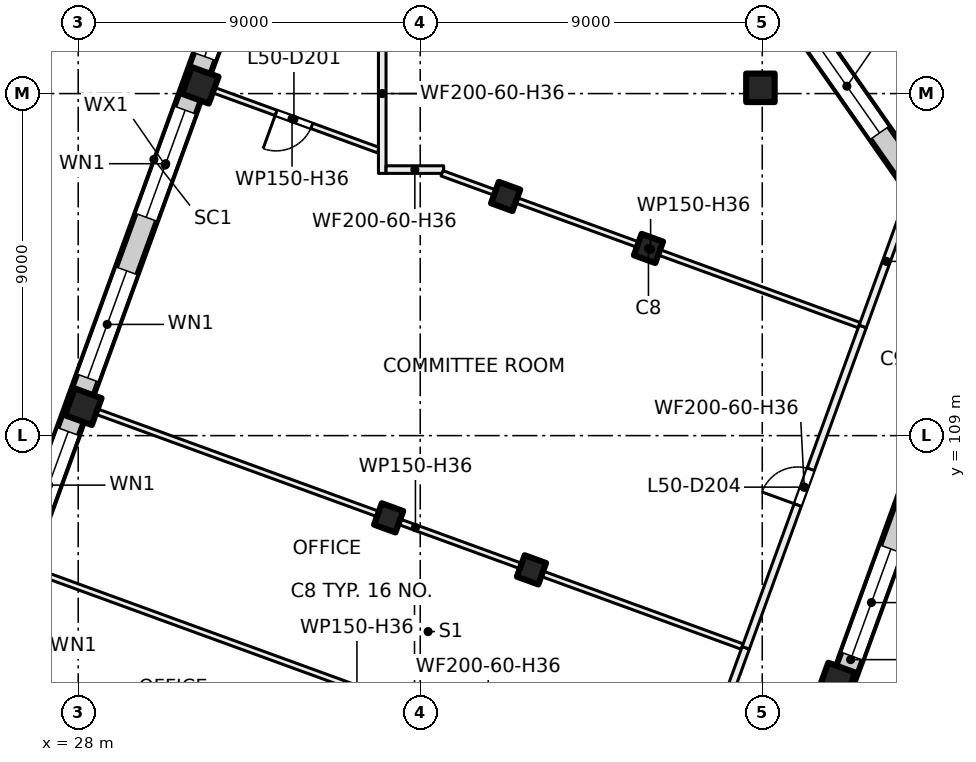
"""IFC4 building model, lengths in metres.
Left out: names, types, materials, properties, quantities, classifications, styles, units other than length and angle.
Written with IfcOpenShell. Run it as: python <this file> out.ifc"""

import sys

from ifc_helpers import new_model, si_unit, direction, frame, frame_2d, origin, origin_2d, place, context, subcontext, project, spatial, rectangle, extrude, element, fill, save


model = new_model("IFC4")
c1 = context("Model", 3, precision=1e-05, world=origin(), true_north=direction((0.0, 1.0)))
c2 = subcontext(c1, "Body", "Model", "MODEL_VIEW")
j1 = project(units=[si_unit("LENGTHUNIT", "METRE"), si_unit("PLANEANGLEUNIT", "RADIAN")], contexts=[c1])
p1 = place(None, origin())
s1 = spatial("IfcSite", under=j1, at=p1, CompositionType="ELEMENT")
p2 = place(p1, origin())
s2 = spatial("IfcBuilding", under=s1, at=p2, CompositionType="ELEMENT")
p3 = place(p2, frame((0.0, 0.0, 212.0)))
s3 = spatial("IfcBuildingStorey", under=s2, at=p3, CompositionType="ELEMENT", Elevation=212.0)
p4 = place(p3, frame((45.952, 118.152, 0.0), z_axis=(0.0, 0.0, 1.0), x_axis=(1.0, 0.0, 0.0)))
e1 = element("IfcColumn", 1, at=p4, inside=s3, PredefinedType="COLUMN", context=c2, shape_type="SweptSolid", body=[
    extrude(rectangle(XDim=0.75, YDim=0.75, at=origin_2d()), origin(), (0.0, 0.0, 1.0), 4.0),
])
for number, where, z_axis, x_axis in (
    (2, (43.006, 113.925, 0.0), (0.0, 0.0, 1.0), (-0.342, -0.94, 0.0)),
    (3, (39.927, 105.468, 0.0), (0.0, 0.0, 1.0), (-0.342, -0.94, 0.0)),
    (4, (39.247, 115.293, 0.0), (0.0, 0.0, 1.0), (-0.342, -0.94, 0.0)),
    (5, (36.169, 106.836, 0.0), (0.0, 0.0, 1.0), (-0.342, -0.94, 0.0)),
):
    element("IfcColumn", number, at=place(p3, frame(where, z_axis=z_axis, x_axis=x_axis)), inside=s3, PredefinedType="COLUMN", context=c2, shape_type="SweptSolid", body=[
        extrude(rectangle(XDim=0.6, YDim=0.6, at=origin_2d()), origin(), (0.0, 0.0, 1.0), 4.0),
    ])
for number, where, z_axis, x_axis in (
    (6, (47.962, 102.544, 0.0), (0.0, 0.0, 1.0), (-0.342, -0.94, 0.0)),
    (7, (31.212, 118.218, 0.0), (0.0, 0.0, 1.0), (-0.342, -0.94, 0.0)),
    (8, (28.134, 109.76, 0.0), (0.0, 0.0, 1.0), (-0.342, -0.94, 0.0)),
):
    element("IfcColumn", number, at=place(p3, frame(where, z_axis=z_axis, x_axis=x_axis)), inside=s3, PredefinedType="COLUMN", context=c2, shape_type="SweptSolid", body=[
        extrude(rectangle(XDim=0.75, YDim=0.75, at=origin_2d()), origin(), (0.0, 0.0, 1.0), 4.0),
    ])
p5 = place(p3, frame((58.083, 117.369, 0.0), z_axis=(0.0, 0.0, 1.0), x_axis=(-0.573573095716, 0.819154383416, 0.0)))
e9 = element("IfcWall", 9, at=p5, inside=s3, PredefinedType="SOLIDWALL", context=c2, shape_type="SweptSolid", body=[
    extrude(rectangle(XDim=26.037, YDim=0.6, at=frame_2d((13.019, 0.0))), origin(), (0.0, 0.0, 1.0), 3.625),
])
p6 = place(p5, frame((1.05, 0.0, 0.0)))
e10 = element("IfcOpeningElement", 10, at=p6, cuts=e9, PredefinedType="OPENING", context=c2, shape_type="SweptSolid", body=[
    extrude(rectangle(XDim=1.8, YDim=2.4, at=frame_2d((0.9, 1.2))), frame((0.0, 0.31, 0.0), z_axis=(0.0, -1.0, 0.0), x_axis=(1.0, 0.0, 0.0)), (0.0, 0.0, 1.0), 0.62),
])
p7 = place(p5, frame((4.829, 0.0, 0.9)))
e11 = element("IfcOpeningElement", 11, at=p7, cuts=e9, PredefinedType="OPENING", context=c2, shape_type="SweptSolid", body=[
    extrude(rectangle(XDim=3.0, YDim=2.4, at=frame_2d((1.5, 1.2))), frame((0.0, 0.31, 0.0), z_axis=(0.0, -1.0, 0.0), x_axis=(1.0, 0.0, 0.0)), (0.0, 0.0, 1.0), 0.62),
])
p8 = place(p5, frame((9.209, 0.0, 0.9)))
e12 = element("IfcOpeningElement", 12, at=p8, cuts=e9, PredefinedType="OPENING", context=c2, shape_type="SweptSolid", body=[
    extrude(rectangle(XDim=3.0, YDim=2.4, at=frame_2d((1.5, 1.2))), frame((0.0, 0.31, 0.0), z_axis=(0.0, -1.0, 0.0), x_axis=(1.0, 0.0, 0.0)), (0.0, 0.0, 1.0), 0.62),
])
p9 = place(p5, frame((13.588, 0.0, 0.9)))
e13 = element("IfcOpeningElement", 13, at=p9, cuts=e9, PredefinedType="OPENING", context=c2, shape_type="SweptSolid", body=[
    extrude(rectangle(XDim=3.0, YDim=2.4, at=frame_2d((1.5, 1.2))), frame((0.0, 0.31, 0.0), z_axis=(0.0, -1.0, 0.0), x_axis=(1.0, 0.0, 0.0)), (0.0, 0.0, 1.0), 0.62),
])
p10 = place(p5, frame((17.968, 0.0, 0.9)))
e14 = element("IfcOpeningElement", 14, at=p10, cuts=e9, PredefinedType="OPENING", context=c2, shape_type="SweptSolid", body=[
    extrude(rectangle(XDim=3.0, YDim=2.4, at=frame_2d((1.5, 1.2))), frame((0.0, 0.31, 0.0), z_axis=(0.0, -1.0, 0.0), x_axis=(1.0, 0.0, 0.0)), (0.0, 0.0, 1.0), 0.62),
])
p11 = place(p5, frame((22.198, 0.0, 0.9)))
e15 = element("IfcOpeningElement", 15, at=p11, cuts=e9, PredefinedType="OPENING", context=c2, shape_type="SweptSolid", body=[
    extrude(rectangle(XDim=3.0, YDim=2.4, at=frame_2d((1.5, 1.2))), frame((0.0, 0.31, 0.0), z_axis=(0.0, -1.0, 0.0), x_axis=(1.0, 0.0, 0.0)), (0.0, 0.0, 1.0), 0.62),
])
p12 = place(p3, frame((51.877, 112.862, 0.0), z_axis=(0.0, 0.0, 1.0), x_axis=(-0.342020589714, -0.939692458314, 0.0)))
e16 = element("IfcWall", 16, at=p12, inside=s3, PredefinedType="SOLIDWALL", context=c2, shape_type="SweptSolid", body=[
    extrude(rectangle(XDim=20.765, YDim=0.6, at=frame_2d((10.382, 0.0))), origin(), (0.0, 0.0, 1.0), 3.625),
])
p13 = place(p12, frame((2.785, 0.0, 0.9)))
e17 = element("IfcOpeningElement", 17, at=p13, cuts=e16, PredefinedType="OPENING", context=c2, shape_type="SweptSolid", body=[
    extrude(rectangle(XDim=3.0, YDim=2.4, at=frame_2d((1.5, 1.2))), frame((0.0, 0.31, 0.0), z_axis=(0.0, -1.0, 0.0), x_axis=(1.0, 0.0, 0.0)), (0.0, 0.0, 1.0), 0.62),
])
p14 = place(p12, frame((7.285, 0.0, 0.9)))
e18 = element("IfcOpeningElement", 18, at=p14, cuts=e16, PredefinedType="OPENING", context=c2, shape_type="SweptSolid", body=[
    extrude(rectangle(XDim=3.0, YDim=2.4, at=frame_2d((1.5, 1.2))), frame((0.0, 0.31, 0.0), z_axis=(0.0, -1.0, 0.0), x_axis=(1.0, 0.0, 0.0)), (0.0, 0.0, 1.0), 0.62),
])
p15 = place(p12, frame((11.785, 0.0, 0.9)))
e19 = element("IfcOpeningElement", 19, at=p15, cuts=e16, PredefinedType="OPENING", context=c2, shape_type="SweptSolid", body=[
    extrude(rectangle(XDim=3.0, YDim=2.4, at=frame_2d((1.5, 1.2))), frame((0.0, 0.31, 0.0), z_axis=(0.0, -1.0, 0.0), x_axis=(1.0, 0.0, 0.0)), (0.0, 0.0, 1.0), 0.62),
])
p16 = place(p12, frame((16.285, 0.0, 0.9)))
e20 = element("IfcOpeningElement", 20, at=p16, cuts=e16, PredefinedType="OPENING", context=c2, shape_type="SweptSolid", body=[
    extrude(rectangle(XDim=3.0, YDim=2.4, at=frame_2d((1.5, 1.2))), frame((0.0, 0.31, 0.0), z_axis=(0.0, -1.0, 0.0), x_axis=(1.0, 0.0, 0.0)), (0.0, 0.0, 1.0), 0.62),
])
p17 = place(p3, frame((36.923, 134.338, 0.0), z_axis=(0.0, 0.0, 1.0), x_axis=(0.573575266068, -0.819152863729, 0.0)))
e21 = element("IfcWall", 21, at=p17, inside=s3, PredefinedType="SOLIDWALL", context=c2, shape_type="SweptSolid", body=[
    extrude(rectangle(XDim=26.117, YDim=0.6, at=frame_2d((13.059, 0.0))), origin(), (0.0, 0.0, 1.0), 3.625),
])
p18 = place(p17, frame((0.84, 0.0, 0.9)))
e22 = element("IfcOpeningElement", 22, at=p18, cuts=e21, PredefinedType="OPENING", context=c2, shape_type="SweptSolid", body=[
    extrude(rectangle(XDim=3.0, YDim=2.4, at=frame_2d((1.5, 1.2))), frame((0.0, 0.31, 0.0), z_axis=(0.0, -1.0, 0.0), x_axis=(1.0, 0.0, 0.0)), (0.0, 0.0, 1.0), 0.62),
])
p19 = place(p17, frame((5.669, 0.0, 0.0)))
e23 = element("IfcOpeningElement", 23, at=p19, cuts=e21, PredefinedType="OPENING", context=c2, shape_type="SweptSolid", body=[
    extrude(rectangle(XDim=1.8, YDim=2.4, at=frame_2d((0.9, 1.2))), frame((0.0, 0.31, 0.0), z_axis=(0.0, -1.0, 0.0), x_axis=(1.0, 0.0, 0.0)), (0.0, 0.0, 1.0), 0.62),
])
p20 = place(p17, frame((9.449, 0.0, 0.9)))
e24 = element("IfcOpeningElement", 24, at=p20, cuts=e21, PredefinedType="OPENING", context=c2, shape_type="SweptSolid", body=[
    extrude(rectangle(XDim=3.0, YDim=2.4, at=frame_2d((1.5, 1.2))), frame((0.0, 0.31, 0.0), z_axis=(0.0, -1.0, 0.0), x_axis=(1.0, 0.0, 0.0)), (0.0, 0.0, 1.0), 0.62),
])
p21 = place(p17, frame((13.829, 0.0, 0.9)))
e25 = element("IfcOpeningElement", 25, at=p21, cuts=e21, PredefinedType="OPENING", context=c2, shape_type="SweptSolid", body=[
    extrude(rectangle(XDim=3.0, YDim=2.4, at=frame_2d((1.5, 1.2))), frame((0.0, 0.31, 0.0), z_axis=(0.0, -1.0, 0.0), x_axis=(1.0, 0.0, 0.0)), (0.0, 0.0, 1.0), 0.62),
])
p22 = place(p17, frame((18.208, 0.0, 0.9)))
e26 = element("IfcOpeningElement", 26, at=p22, cuts=e21, PredefinedType="OPENING", context=c2, shape_type="SweptSolid", body=[
    extrude(rectangle(XDim=3.0, YDim=2.4, at=frame_2d((1.5, 1.2))), frame((0.0, 0.31, 0.0), z_axis=(0.0, -1.0, 0.0), x_axis=(1.0, 0.0, 0.0)), (0.0, 0.0, 1.0), 0.62),
])
p23 = place(p17, frame((22.438, 0.0, 0.9)))
e27 = element("IfcOpeningElement", 27, at=p23, cuts=e21, PredefinedType="OPENING", context=c2, shape_type="SweptSolid", body=[
    extrude(rectangle(XDim=3.0, YDim=2.4, at=frame_2d((1.5, 1.2))), frame((0.0, 0.31, 0.0), z_axis=(0.0, -1.0, 0.0), x_axis=(1.0, 0.0, 0.0)), (0.0, 0.0, 1.0), 0.62),
])
p24 = place(p3, frame((24.666, 100.669, 0.0), z_axis=(0.0, 0.0, 1.0), x_axis=(0.34201964167, 0.939692803373, 0.0)))
e28 = element("IfcWall", 28, at=p24, inside=s3, PredefinedType="SOLIDWALL", context=c2, shape_type="SweptSolid", body=[
    extrude(rectangle(XDim=32.884, YDim=0.6, at=frame_2d((16.442, 0.0))), origin(), (0.0, 0.0, 1.0), 3.625),
])
p25 = place(p24, frame((1.48, 0.0, 0.9)))
e29 = element("IfcOpeningElement", 29, at=p25, cuts=e28, PredefinedType="OPENING", context=c2, shape_type="SweptSolid", body=[
    extrude(rectangle(XDim=3.0, YDim=2.4, at=frame_2d((1.5, 1.2))), frame((0.0, 0.31, 0.0), z_axis=(0.0, -1.0, 0.0), x_axis=(1.0, 0.0, 0.0)), (0.0, 0.0, 1.0), 0.62),
])
p26 = place(p24, frame((5.98, 0.0, 0.9)))
e30 = element("IfcOpeningElement", 30, at=p26, cuts=e28, PredefinedType="OPENING", context=c2, shape_type="SweptSolid", body=[
    extrude(rectangle(XDim=3.0, YDim=2.4, at=frame_2d((1.5, 1.2))), frame((0.0, 0.31, 0.0), z_axis=(0.0, -1.0, 0.0), x_axis=(1.0, 0.0, 0.0)), (0.0, 0.0, 1.0), 0.62),
])
p27 = place(p24, frame((10.48, 0.0, 0.9)))
e31 = element("IfcOpeningElement", 31, at=p27, cuts=e28, PredefinedType="OPENING", context=c2, shape_type="SweptSolid", body=[
    extrude(rectangle(XDim=3.0, YDim=2.4, at=frame_2d((1.5, 1.2))), frame((0.0, 0.31, 0.0), z_axis=(0.0, -1.0, 0.0), x_axis=(1.0, 0.0, 0.0)), (0.0, 0.0, 1.0), 0.62),
])
p28 = place(p24, frame((14.98, 0.0, 0.9)))
e32 = element("IfcOpeningElement", 32, at=p28, cuts=e28, PredefinedType="OPENING", context=c2, shape_type="SweptSolid", body=[
    extrude(rectangle(XDim=3.0, YDim=2.4, at=frame_2d((1.5, 1.2))), frame((0.0, 0.31, 0.0), z_axis=(0.0, -1.0, 0.0), x_axis=(1.0, 0.0, 0.0)), (0.0, 0.0, 1.0), 0.62),
])
p29 = place(p24, frame((19.48, 0.0, 0.9)))
e33 = element("IfcOpeningElement", 33, at=p29, cuts=e28, PredefinedType="OPENING", context=c2, shape_type="SweptSolid", body=[
    extrude(rectangle(XDim=3.0, YDim=2.4, at=frame_2d((1.5, 1.2))), frame((0.0, 0.31, 0.0), z_axis=(0.0, -1.0, 0.0), x_axis=(1.0, 0.0, 0.0)), (0.0, 0.0, 1.0), 0.62),
])
p30 = place(p24, frame((23.98, 0.0, 0.9)))
e34 = element("IfcOpeningElement", 34, at=p30, cuts=e28, PredefinedType="OPENING", context=c2, shape_type="SweptSolid", body=[
    extrude(rectangle(XDim=3.0, YDim=2.4, at=frame_2d((1.5, 1.2))), frame((0.0, 0.31, 0.0), z_axis=(0.0, -1.0, 0.0), x_axis=(1.0, 0.0, 0.0)), (0.0, 0.0, 1.0), 0.62),
])
p31 = place(p24, frame((28.48, 0.0, 0.9)))
e35 = element("IfcOpeningElement", 35, at=p31, cuts=e28, PredefinedType="OPENING", context=c2, shape_type="SweptSolid", body=[
    extrude(rectangle(XDim=3.0, YDim=2.4, at=frame_2d((1.5, 1.2))), frame((0.0, 0.31, 0.0), z_axis=(0.0, -1.0, 0.0), x_axis=(1.0, 0.0, 0.0)), (0.0, 0.0, 1.0), 0.62),
])
p32 = place(p3, frame((26.737, 105.481, 0.0), z_axis=(0.0, 0.0, 1.0), x_axis=(0.939664418128, -0.342097619554, 0.0)))
e36 = element("IfcWall", 36, at=p32, inside=s3, PredefinedType="PARTITIONING", context=c2, shape_type="SweptSolid", body=[
    extrude(rectangle(XDim=18.299, YDim=0.15, at=frame_2d((9.149, 0.0))), origin(), (0.0, 0.0, 1.0), 3.625),
])
p33 = place(p3, frame((28.275, 109.709, 0.0), z_axis=(0.0, 0.0, 1.0), x_axis=(0.939695619185, -0.342011905181, 0.0)))
e37 = element("IfcWall", 37, at=p33, inside=s3, PredefinedType="PARTITIONING", context=c2, shape_type="SweptSolid", body=[
    extrude(rectangle(XDim=18.301, YDim=0.15, at=frame_2d((9.15, 0.0))), origin(), (0.0, 0.0, 1.0), 3.625),
])
p34 = place(p3, frame((35.9, 116.511, 0.0), z_axis=(0.0, 0.0, 1.0), x_axis=(-0.939620956464, 0.342216975284, 0.0)))
e38 = element("IfcWall", 38, at=p34, inside=s3, PredefinedType="PARTITIONING", context=c2, shape_type="SweptSolid", body=[
    extrude(rectangle(XDim=4.839, YDim=0.15, at=frame_2d((2.419, 0.0))), origin(), (0.0, 0.0, 1.0), 3.625),
])
p35 = place(p34, frame((1.866, 0.0, 0.0)))
e39 = element("IfcOpeningElement", 39, at=p35, cuts=e38, PredefinedType="OPENING", context=c2, shape_type="SweptSolid", body=[
    extrude(rectangle(XDim=1.0, YDim=2.1, at=frame_2d((0.5, 1.05))), frame((0.0, 0.085, 0.0), z_axis=(0.0, -1.0, 0.0), x_axis=(1.0, 0.0, 0.0)), (0.0, 0.0, 1.0), 0.17),
])
p36 = place(p3, frame((36.0, 115.9, 0.0), z_axis=(0.0, 0.0, 1.0), x_axis=(0.0, 1.0, 0.0)))
e40 = element("IfcWall", 40, at=p36, inside=s3, PredefinedType="PARTITIONING", context=c2, shape_type="SweptSolid", body=[
    extrude(rectangle(XDim=4.2, YDim=0.2, at=frame_2d((2.1, 0.0))), origin(), (0.0, 0.0, 1.0), 3.625),
])
p37 = place(p3, frame((36.1, 116.0, 0.0), z_axis=(0.0, 0.0, 1.0), x_axis=(1.0, 0.0, 0.0)))
e41 = element("IfcWall", 41, at=p37, inside=s3, PredefinedType="PARTITIONING", context=c2, shape_type="SweptSolid", body=[
    extrude(rectangle(XDim=1.516, YDim=0.2, at=frame_2d((0.758, 0.0))), origin(), (0.0, 0.0, 1.0), 3.625),
])
p38 = place(p3, frame((37.574, 115.902, 0.0), z_axis=(0.0, 0.0, 1.0), x_axis=(0.939688414098, -0.342031700883, 0.0)))
e42 = element("IfcWall", 42, at=p38, inside=s3, PredefinedType="PARTITIONING", context=c2, shape_type="SweptSolid", body=[
    extrude(rectangle(XDim=11.681, YDim=0.15, at=frame_2d((5.84, 0.0))), origin(), (0.0, 0.0, 1.0), 3.625),
])
p39 = place(p3, frame((44.026, 99.187, 0.0), z_axis=(0.0, 0.0, 1.0), x_axis=(0.342178571597, 0.939634942486, 0.0)))
e43 = element("IfcWall", 43, at=p39, inside=s3, PredefinedType="PARTITIONING", context=c2, shape_type="SweptSolid", body=[
    extrude(rectangle(XDim=4.501, YDim=0.2, at=frame_2d((2.25, 0.0))), origin(), (0.0, 0.0, 1.0), 3.625),
])
p40 = place(p39, frame((1.75, 0.0, 0.0)))
e44 = element("IfcOpeningElement", 44, at=p40, cuts=e43, PredefinedType="OPENING", context=c2, shape_type="SweptSolid", body=[
    extrude(rectangle(XDim=1.0, YDim=2.1, at=frame_2d((0.5, 1.05))), frame((0.0, 0.11, 0.0), z_axis=(0.0, -1.0, 0.0), x_axis=(1.0, 0.0, 0.0)), (0.0, 0.0, 1.0), 0.22),
])
p41 = place(p3, frame((45.566, 103.416, 0.0), z_axis=(0.0, 0.0, 1.0), x_axis=(0.3420218461, 0.939692001025, 0.0)))
e45 = element("IfcWall", 45, at=p41, inside=s3, PredefinedType="PARTITIONING", context=c2, shape_type="SweptSolid", body=[
    extrude(rectangle(XDim=9.0, YDim=0.2, at=frame_2d((4.5, 0.0))), origin(), (0.0, 0.0, 1.0), 3.625),
])
p42 = place(p41, frame((4.0, 0.0, 0.0)))
e46 = element("IfcOpeningElement", 46, at=p42, cuts=e45, PredefinedType="OPENING", context=c2, shape_type="SweptSolid", body=[
    extrude(rectangle(XDim=1.0, YDim=2.1, at=frame_2d((0.5, 1.05))), frame((0.0, 0.11, 0.0), z_axis=(0.0, -1.0, 0.0), x_axis=(1.0, 0.0, 0.0)), (0.0, 0.0, 1.0), 0.22),
])
p43 = place(p3, frame((48.644, 111.873, 0.0), z_axis=(0.0, 0.0, 1.0), x_axis=(0.342028270269, 0.939689662781, 0.0)))
e47 = element("IfcWall", 47, at=p43, inside=s3, PredefinedType="PARTITIONING", context=c2, shape_type="SweptSolid", body=[
    extrude(rectangle(XDim=3.643, YDim=0.2, at=frame_2d((1.821, 0.0))), origin(), (0.0, 0.0, 1.0), 3.625),
])
p44 = place(p14, origin())
e48 = element("IfcWindow", 48, at=p44, inside=s3, PartitioningType="SINGLE_PANEL", PredefinedType="WINDOW", context=c2, shape_type="SweptSolid", body=[
    extrude(rectangle(XDim=3.0, YDim=2.4, at=frame_2d((1.5, 1.2))), frame((0.0, 0.03, 0.0), z_axis=(0.0, -1.0, 0.0), x_axis=(1.0, 0.0, 0.0)), (0.0, 0.0, 1.0), 0.06),
])
fill(e18, e48)
p45 = place(p22, origin())
e49 = element("IfcWindow", 49, at=p45, inside=s3, PartitioningType="SINGLE_PANEL", PredefinedType="WINDOW", context=c2, shape_type="SweptSolid", body=[
    extrude(rectangle(XDim=3.0, YDim=2.4, at=frame_2d((1.5, 1.2))), frame((0.0, 0.03, 0.0), z_axis=(0.0, -1.0, 0.0), x_axis=(1.0, 0.0, 0.0)), (0.0, 0.0, 1.0), 0.06),
])
fill(e26, e49)
p46 = place(p26, origin())
e50 = element("IfcWindow", 50, at=p46, inside=s3, PartitioningType="SINGLE_PANEL", PredefinedType="WINDOW", context=c2, shape_type="SweptSolid", body=[
    extrude(rectangle(XDim=3.0, YDim=2.4, at=frame_2d((1.5, 1.2))), frame((0.0, 0.03, 0.0), z_axis=(0.0, -1.0, 0.0), x_axis=(1.0, 0.0, 0.0)), (0.0, 0.0, 1.0), 0.06),
])
fill(e30, e50)
p47 = place(p27, origin())
e51 = element("IfcWindow", 51, at=p47, inside=s3, PartitioningType="SINGLE_PANEL", PredefinedType="WINDOW", context=c2, shape_type="SweptSolid", body=[
    extrude(rectangle(XDim=3.0, YDim=2.4, at=frame_2d((1.5, 1.2))), frame((0.0, 0.03, 0.0), z_axis=(0.0, -1.0, 0.0), x_axis=(1.0, 0.0, 0.0)), (0.0, 0.0, 1.0), 0.06),
])
fill(e31, e51)
p48 = place(p28, origin())
e52 = element("IfcWindow", 52, at=p48, inside=s3, PartitioningType="SINGLE_PANEL", PredefinedType="WINDOW", context=c2, shape_type="SweptSolid", body=[
    extrude(rectangle(XDim=3.0, YDim=2.4, at=frame_2d((1.5, 1.2))), frame((0.0, 0.03, 0.0), z_axis=(0.0, -1.0, 0.0), x_axis=(1.0, 0.0, 0.0)), (0.0, 0.0, 1.0), 0.06),
])
fill(e32, e52)
p49 = place(p29, origin())
e53 = element("IfcWindow", 53, at=p49, inside=s3, PartitioningType="SINGLE_PANEL", PredefinedType="WINDOW", context=c2, shape_type="SweptSolid", body=[
    extrude(rectangle(XDim=3.0, YDim=2.4, at=frame_2d((1.5, 1.2))), frame((0.0, 0.03, 0.0), z_axis=(0.0, -1.0, 0.0), x_axis=(1.0, 0.0, 0.0)), (0.0, 0.0, 1.0), 0.06),
])
fill(e33, e53)
p50 = place(p35, origin())
e54 = element("IfcDoor", 54, at=p50, inside=s3, OperationType="SINGLE_SWING_RIGHT", PredefinedType="DOOR", context=c2, shape_type="SweptSolid", body=[
    extrude(rectangle(XDim=1.0, YDim=2.1, at=frame_2d((0.5, 1.05))), frame((0.0, 0.025, 0.0), z_axis=(0.0, -1.0, 0.0), x_axis=(1.0, 0.0, 0.0)), (0.0, 0.0, 1.0), 0.05),
])
fill(e39, e54)
p51 = place(p42, origin())
e55 = element("IfcDoor", 55, at=p51, inside=s3, OperationType="SINGLE_SWING_LEFT", PredefinedType="DOOR", context=c2, shape_type="SweptSolid", body=[
    extrude(rectangle(XDim=1.0, YDim=2.1, at=frame_2d((0.5, 1.05))), frame((0.0, 0.025, 0.0), z_axis=(0.0, -1.0, 0.0), x_axis=(1.0, 0.0, 0.0)), (0.0, 0.0, 1.0), 0.05),
])
fill(e46, e55)
save(model, sys.argv[1])
